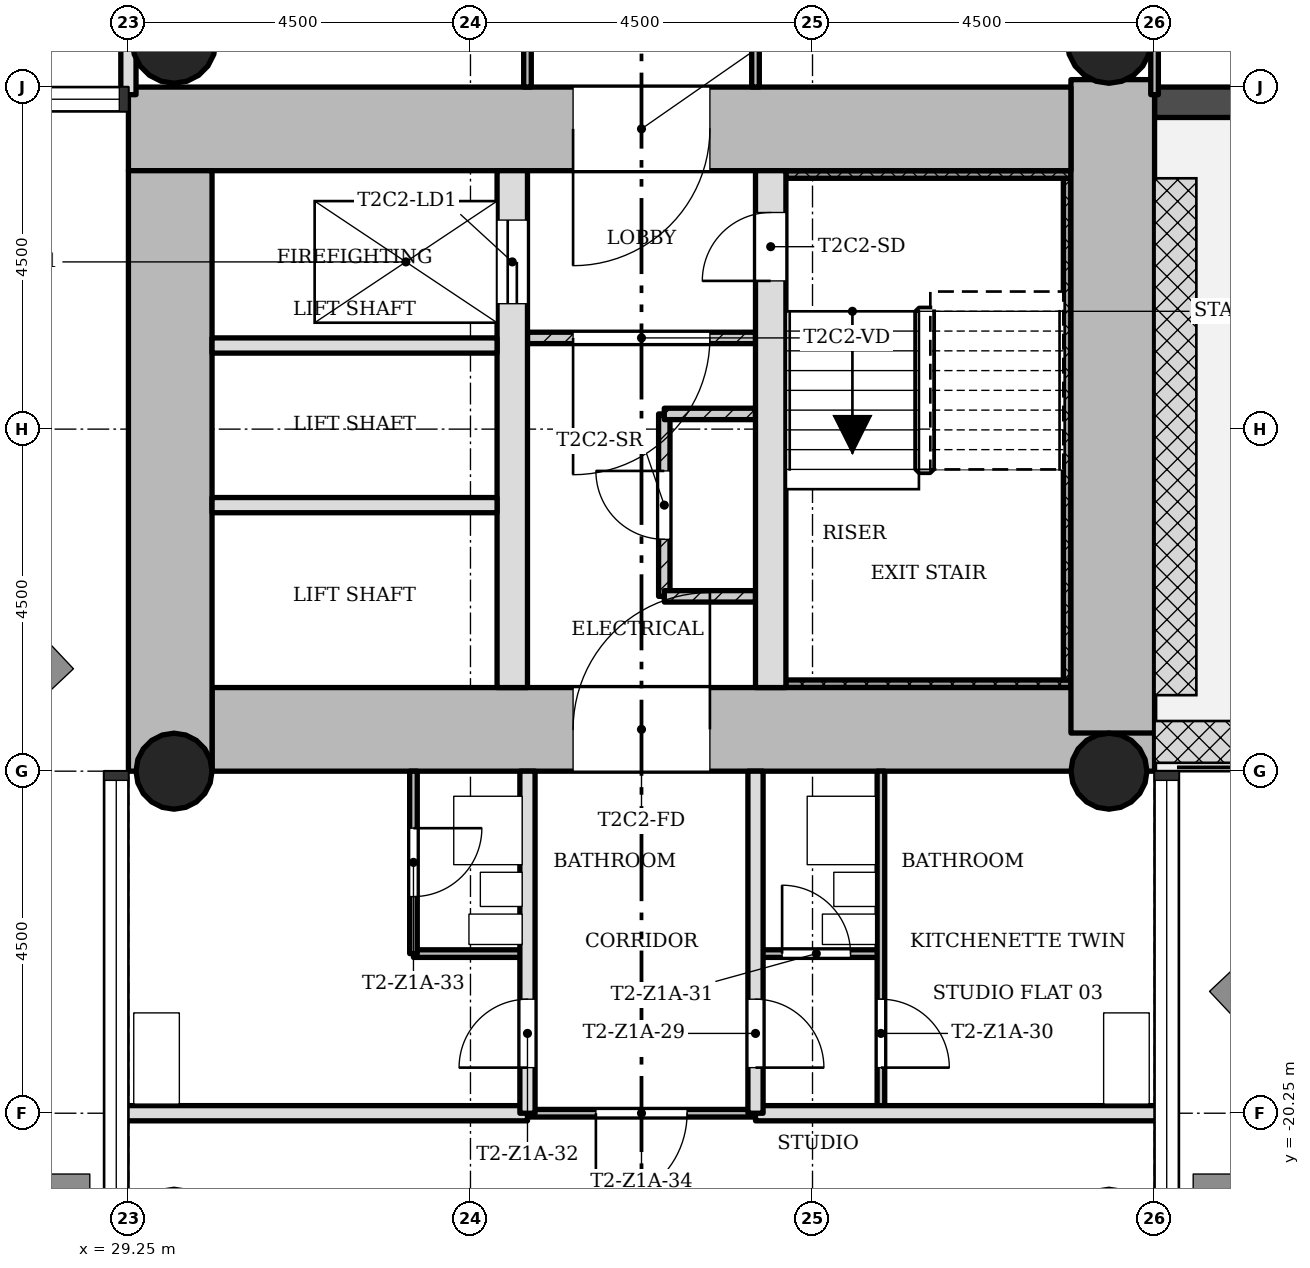
"""IFC4 building model, lengths in metres.
Left out: names, types, materials, properties, quantities, classifications, styles, units other than length and angle.
Written with IfcOpenShell. Run it as: python <this file> out.ifc"""

import sys

from ifc_helpers import new_model, si_unit, direction, frame, frame_2d, origin, origin_2d, place, context, subcontext, project, spatial, rectangle, hollow_circle, extrude, element, fill, save


model = new_model("IFC4")
c1 = context("Model", 3, precision=1e-05, world=origin(), true_north=direction((0.0, 1.0)))
c2 = subcontext(c1, "Body", "Model", "MODEL_VIEW")
j1 = project(units=[si_unit("LENGTHUNIT", "METRE"), si_unit("PLANEANGLEUNIT", "RADIAN")], contexts=[c1])
p1 = place(None, origin())
s1 = spatial("IfcSite", under=j1, at=p1, CompositionType="ELEMENT")
p2 = place(p1, origin())
s2 = spatial("IfcBuilding", under=s1, at=p2, CompositionType="ELEMENT")
p3 = place(p2, frame((0.0, 0.0, 31.3)))
s3 = spatial("IfcBuildingStorey", under=s2, at=p3, CompositionType="ELEMENT", Elevation=31.3)
p4 = place(p3, frame((30.35, -15.2, 0.0), z_axis=(0.0, 0.0, 1.0), x_axis=(1.0, 0.0, 0.0)))
e1 = element("IfcWall", 1, at=p4, inside=s3, PredefinedType="SHEAR", context=c2, shape_type="SweptSolid", body=[
    extrude(rectangle(XDim=12.4, YDim=1.1, at=frame_2d((6.2, 0.0))), origin(), (0.0, 0.0, 1.0), 3.4),
])
p5 = place(p4, frame((4.75, 0.0, 0.0)))
e2 = element("IfcOpeningElement", 2, at=p5, cuts=e1, PredefinedType="OPENING", context=c2, shape_type="SweptSolid", body=[
    extrude(rectangle(XDim=1.8, YDim=2.1, at=frame_2d((0.9, 1.05))), frame((0.0, 0.56, 0.0), z_axis=(0.0, -1.0, 0.0), x_axis=(1.0, 0.0, 0.0)), (0.0, 0.0, 1.0), 1.12),
])
p6 = place(p3, frame((42.2, -15.248, 0.0), z_axis=(0.0, 0.0, 1.0), x_axis=(0.0, 1.0, 0.0)))
e3 = element("IfcWall", 3, at=p6, inside=s3, PredefinedType="SHEAR", context=c2, shape_type="SweptSolid", body=[
    extrude(rectangle(XDim=8.596, YDim=1.1, at=frame_2d((4.298, 0.0))), origin(), (0.0, 0.0, 1.0), 3.4),
])
p7 = place(p3, frame((41.65, -7.3, 0.0), z_axis=(0.0, 0.0, 1.0), x_axis=(-1.0, 0.0, 0.0)))
e4 = element("IfcWall", 4, at=p7, inside=s3, PredefinedType="SHEAR", context=c2, shape_type="SweptSolid", body=[
    extrude(rectangle(XDim=12.4, YDim=1.1, at=frame_2d((6.2, 0.0))), origin(), (0.0, 0.0, 1.0), 3.4),
])
p8 = place(p7, frame((4.75, 0.0, 0.0)))
e5 = element("IfcOpeningElement", 5, at=p8, cuts=e4, PredefinedType="OPENING", context=c2, shape_type="SweptSolid", body=[
    extrude(rectangle(XDim=1.8, YDim=2.1, at=frame_2d((0.9, 1.05))), frame((0.0, 0.56, 0.0), z_axis=(0.0, -1.0, 0.0), x_axis=(1.0, 0.0, 0.0)), (0.0, 0.0, 1.0), 1.12),
])
p9 = place(p3, frame((29.8, -7.85, 0.0), z_axis=(0.0, 0.0, 1.0), x_axis=(0.0, -1.0, 0.0)))
e6 = element("IfcWall", 6, at=p9, inside=s3, PredefinedType="SHEAR", context=c2, shape_type="SweptSolid", body=[
    extrude(rectangle(XDim=7.9, YDim=1.1, at=frame_2d((3.95, 0.0))), origin(), (0.0, 0.0, 1.0), 3.4),
])
p10 = place(p3, frame((34.3, -14.65, 0.0), z_axis=(0.0, 0.0, 1.0), x_axis=(0.0, 1.0, 0.0)))
e7 = element("IfcWall", 7, at=p10, inside=s3, PredefinedType="SHEAR", context=c2, shape_type="SweptSolid", body=[
    extrude(rectangle(XDim=6.8, YDim=0.4, at=frame_2d((3.4, 0.0))), origin(), (0.0, 0.0, 1.0), 3.4),
])
p11 = place(p10, frame((5.05, 0.0, 0.0)))
e8 = element("IfcOpeningElement", 8, at=p11, cuts=e7, PredefinedType="OPENING", context=c2, shape_type="SweptSolid", body=[
    extrude(rectangle(XDim=1.1, YDim=2.1, at=frame_2d((0.55, 1.05))), frame((0.0, 0.21, 0.0), z_axis=(0.0, -1.0, 0.0), x_axis=(1.0, 0.0, 0.0)), (0.0, 0.0, 1.0), 0.42),
])
p12 = place(p3, frame((37.7, -14.65, 0.0), z_axis=(0.0, 0.0, 1.0), x_axis=(0.0, 1.0, 0.0)))
e9 = element("IfcWall", 9, at=p12, inside=s3, PredefinedType="SHEAR", context=c2, shape_type="SweptSolid", body=[
    extrude(rectangle(XDim=6.8, YDim=0.4, at=frame_2d((3.4, 0.0))), origin(), (0.0, 0.0, 1.0), 3.4),
])
p13 = place(p12, frame((5.35, 0.0, 0.0)))
e10 = element("IfcOpeningElement", 10, at=p13, cuts=e9, PredefinedType="OPENING", context=c2, shape_type="SweptSolid", body=[
    extrude(rectangle(XDim=0.9, YDim=2.1, at=frame_2d((0.45, 1.05))), frame((0.0, 0.21, 0.0), z_axis=(0.0, -1.0, 0.0), x_axis=(1.0, 0.0, 0.0)), (0.0, 0.0, 1.0), 0.42),
])
for number, where, z_axis, x_axis in (
    (11, (42.15, -15.75, 0.0), (0.0, 0.0, 1.0), (1.0, 0.0, 0.0)),
    (12, (29.85, -15.75, 0.0), (0.0, 0.0, 1.0), (1.0, 0.0, 0.0)),
):
    element("IfcColumn", number, at=place(p3, frame(where, z_axis=z_axis, x_axis=x_axis)), inside=s3, PredefinedType="COLUMN", context=c2, shape_type="SweptSolid", body=[
        extrude(hollow_circle(Radius=0.5, WallThickness=0.036, at=origin_2d()), origin(), (0.0, 0.0, 1.0), 3.4),
    ])
for number, where, z_axis, x_axis in (
    (13, (42.15, -6.15, 0.0), (0.0, 0.0, 1.0), (1.0, 0.0, 0.0)),
    (14, (29.85, -6.15, 0.0), (0.0, 0.0, 1.0), (1.0, 0.0, 0.0)),
):
    element("IfcColumn", number, at=place(p3, frame(where, z_axis=z_axis, x_axis=x_axis)), inside=s3, PredefinedType="COLUMN", context=c2, shape_type="SweptSolid", body=[
        extrude(hollow_circle(Radius=0.55, WallThickness=0.04, at=origin_2d()), origin(), (0.0, 0.0, 1.0), 3.4),
    ])
p14 = place(p3, frame((42.75, -6.95, -0.02), z_axis=(0.0, 0.0, 1.0), x_axis=(1.0, 0.0, 0.0)))
e15 = element("IfcWall", 15, at=p14, inside=s3, PredefinedType="STANDARD", context=c2, shape_type="SweptSolid", body=[
    extrude(rectangle(XDim=4.5, YDim=0.4, at=frame_2d((2.25, 0.0))), origin(), (0.0, 0.0, 1.0), 3.12),
])
p15 = place(p14, frame((1.35, 0.0, 0.02)))
e16 = element("IfcOpeningElement", 16, at=p15, cuts=e15, PredefinedType="OPENING", context=c2, shape_type="SweptSolid", body=[
    extrude(rectangle(XDim=1.8, YDim=2.1, at=frame_2d((0.9, 1.05))), frame((0.0, 0.21, 0.0), z_axis=(0.0, -1.0, 0.0), x_axis=(1.0, 0.0, 0.0)), (0.0, 0.0, 1.0), 0.42),
])
p16 = place(p3, frame((34.5, -10.05, 0.0), z_axis=(0.0, 0.0, 1.0), x_axis=(1.0, 0.0, 0.0)))
e17 = element("IfcWall", 17, at=p16, inside=s3, PredefinedType="PARTITIONING", context=c2, shape_type="SweptSolid", body=[
    extrude(rectangle(XDim=3.0, YDim=0.15, at=frame_2d((1.5, 0.0))), origin(), (0.0, 0.0, 1.0), 3.0),
])
p17 = place(p16, frame((0.6, 0.0, 0.0)))
e18 = element("IfcOpeningElement", 18, at=p17, cuts=e17, PredefinedType="OPENING", context=c2, shape_type="SweptSolid", body=[
    extrude(rectangle(XDim=1.8, YDim=2.1, at=frame_2d((0.9, 1.05))), frame((0.0, 0.085, 0.0), z_axis=(0.0, -1.0, 0.0), x_axis=(1.0, 0.0, 0.0)), (0.0, 0.0, 1.0), 0.17),
])
for number, where, z_axis, x_axis in (
    (19, (30.35, -10.15, 0.0), (0.0, 0.0, 1.0), (1.0, 0.0, 0.0)),
    (20, (30.35, -12.25, 0.0), (0.0, 0.0, 1.0), (1.0, 0.0, 0.0)),
):
    element("IfcWall", number, at=place(p3, frame(where, z_axis=z_axis, x_axis=x_axis)), inside=s3, PredefinedType="SOLIDWALL", context=c2, shape_type="SweptSolid", body=[
        extrude(rectangle(XDim=3.75, YDim=0.2, at=frame_2d((1.875, 0.0))), origin(), (0.0, 0.0, 1.0), 3.0),
    ])
p18 = place(p3, frame((36.3, -11.05, 0.0), z_axis=(0.0, 0.0, 1.0), x_axis=(0.0, -1.0, 0.0)))
e21 = element("IfcWall", 21, at=p18, inside=s3, PredefinedType="PARTITIONING", context=c2, shape_type="SweptSolid", body=[
    extrude(rectangle(XDim=2.4, YDim=0.15, at=frame_2d((1.2, 0.0))), origin(), (0.0, 0.0, 1.0), 3.0),
])
p19 = place(p18, frame((0.75, 0.0, 0.0)))
e22 = element("IfcOpeningElement", 22, at=p19, cuts=e21, PredefinedType="OPENING", context=c2, shape_type="SweptSolid", body=[
    extrude(rectangle(XDim=0.9, YDim=2.1, at=frame_2d((0.45, 1.05))), frame((0.0, 0.085, 0.0), z_axis=(0.0, -1.0, 0.0), x_axis=(1.0, 0.0, 0.0)), (0.0, 0.0, 1.0), 0.17),
])
for number, where, z_axis, x_axis in (
    (23, (36.3, -11.05, 0.0), (0.0, 0.0, 1.0), (1.0, 0.0, 0.0)),
    (24, (36.3, -13.45, 0.0), (0.0, 0.0, 1.0), (1.0, 0.0, 0.0)),
):
    element("IfcWall", number, at=place(p3, frame(where, z_axis=z_axis, x_axis=x_axis)), inside=s3, PredefinedType="PARTITIONING", context=c2, shape_type="SweptSolid", body=[
        extrude(rectangle(XDim=1.2, YDim=0.15, at=frame_2d((0.6, 0.0))), origin(), (0.0, 0.0, 1.0), 3.0),
    ])
p20 = place(p3, frame((37.5, -20.25, 0.0), z_axis=(0.0, 0.0, 1.0), x_axis=(-1.0, 0.0, 0.0)))
e25 = element("IfcWall", 25, at=p20, inside=s3, PredefinedType="PARTITIONING", context=c2, shape_type="SweptSolid", body=[
    extrude(rectangle(XDim=3.0, YDim=0.1, at=frame_2d((1.5, 0.0))), origin(), (0.0, 0.0, 1.0), 3.0),
])
p21 = place(p20, frame((0.9, 0.0, 0.0)))
e26 = element("IfcOpeningElement", 26, at=p21, cuts=e25, PredefinedType="OPENING", context=c2, shape_type="SweptSolid", body=[
    extrude(rectangle(XDim=1.2, YDim=2.1, at=frame_2d((0.6, 1.05))), frame((0.0, 0.06, 0.0), z_axis=(0.0, -1.0, 0.0), x_axis=(1.0, 0.0, 0.0)), (0.0, 0.0, 1.0), 0.12),
])
for number, where, z_axis, x_axis in (
    (27, (42.85, -20.25, 0.0), (0.0, 0.0, 1.0), (-1.0, 0.0, 0.0)),
    (28, (34.5, -20.25, 0.0), (0.0, 0.0, 1.0), (-1.0, 0.0, 0.0)),
):
    element("IfcWall", number, at=place(p3, frame(where, z_axis=z_axis, x_axis=x_axis)), inside=s3, PredefinedType="SOLIDWALL", context=c2, shape_type="SweptSolid", body=[
        extrude(rectangle(XDim=5.35, YDim=0.2, at=frame_2d((2.675, 0.0))), origin(), (0.0, 0.0, 1.0), 3.0),
    ])
p22 = place(p3, frame((39.15, -18.15, 0.0), z_axis=(0.0, 0.0, 1.0), x_axis=(-1.0, 0.0, 0.0)))
e29 = element("IfcWall", 29, at=p22, inside=s3, PredefinedType="PARTITIONING", context=c2, shape_type="SweptSolid", body=[
    extrude(rectangle(XDim=1.65, YDim=0.1, at=frame_2d((0.825, 0.0))), origin(), (0.0, 0.0, 1.0), 3.0),
])
p23 = place(p22, frame((0.4, 0.0, 0.0)))
e30 = element("IfcOpeningElement", 30, at=p23, cuts=e29, PredefinedType="OPENING", context=c2, shape_type="SweptSolid", body=[
    extrude(rectangle(XDim=0.9, YDim=2.1, at=frame_2d((0.45, 1.05))), frame((0.0, 0.06, 0.0), z_axis=(0.0, -1.0, 0.0), x_axis=(1.0, 0.0, 0.0)), (0.0, 0.0, 1.0), 0.12),
])
p24 = place(p3, frame((34.5, -18.15, 0.0), z_axis=(0.0, 0.0, 1.0), x_axis=(-1.0, 0.0, 0.0)))
e31 = element("IfcWall", 31, at=p24, inside=s3, PredefinedType="PARTITIONING", context=c2, shape_type="SweptSolid", body=[
    extrude(rectangle(XDim=1.5, YDim=0.1, at=frame_2d((0.75, 0.0))), origin(), (0.0, 0.0, 1.0), 3.0),
])
p25 = place(p3, frame((42.75, -6.85, 0.0), z_axis=(0.0, 0.0, 1.0), x_axis=(0.0, 1.0, 0.0)))
e32 = element("IfcWall", 32, at=p25, inside=s3, PredefinedType="PARTITIONING", context=c2, shape_type="SweptSolid", body=[
    extrude(rectangle(XDim=5.95, YDim=0.1, at=frame_2d((2.975, 0.0))), origin(), (0.0, 0.0, 1.0), 3.0),
])
p26 = place(p3, frame((39.15, -20.25, 0.0), z_axis=(0.0, 0.0, 1.0), x_axis=(0.0, 1.0, 0.0)))
e33 = element("IfcWall", 33, at=p26, inside=s3, PredefinedType="PARTITIONING", context=c2, shape_type="SweptSolid", body=[
    extrude(rectangle(XDim=4.5, YDim=0.1, at=frame_2d((2.25, 0.0))), origin(), (0.0, 0.0, 1.0), 3.0),
])
p27 = place(p26, frame((0.6, 0.0, 0.0)))
e34 = element("IfcOpeningElement", 34, at=p27, cuts=e33, PredefinedType="OPENING", context=c2, shape_type="SweptSolid", body=[
    extrude(rectangle(XDim=0.9, YDim=2.1, at=frame_2d((0.45, 1.05))), frame((0.0, 0.06, 0.0), z_axis=(0.0, -1.0, 0.0), x_axis=(1.0, 0.0, 0.0)), (0.0, 0.0, 1.0), 0.12),
])
p28 = place(p3, frame((37.5, -6.75, 0.0), z_axis=(0.0, 0.0, 1.0), x_axis=(0.0, 1.0, 0.0)))
e35 = element("IfcWall", 35, at=p28, inside=s3, PredefinedType="PARTITIONING", context=c2, shape_type="SweptSolid", body=[
    extrude(rectangle(XDim=5.85, YDim=0.1, at=frame_2d((2.925, 0.0))), origin(), (0.0, 0.0, 1.0), 3.0),
])
p29 = place(p28, frame((1.575, 0.0, 0.0)))
e36 = element("IfcOpeningElement", 36, at=p29, cuts=e35, PredefinedType="OPENING", context=c2, shape_type="SweptSolid", body=[
    extrude(rectangle(XDim=0.9, YDim=2.1, at=frame_2d((0.45, 1.05))), frame((0.0, 0.06, 0.0), z_axis=(0.0, -1.0, 0.0), x_axis=(1.0, 0.0, 0.0)), (0.0, 0.0, 1.0), 0.12),
])
p30 = place(p3, frame((37.5, -20.25, 0.0), z_axis=(0.0, 0.0, 1.0), x_axis=(0.0, 1.0, 0.0)))
e37 = element("IfcWall", 37, at=p30, inside=s3, PredefinedType="SOLIDWALL", context=c2, shape_type="SweptSolid", body=[
    extrude(rectangle(XDim=4.5, YDim=0.2, at=frame_2d((2.25, 0.0))), origin(), (0.0, 0.0, 1.0), 3.0),
])
p31 = place(p30, frame((0.6, 0.0, 0.0)))
e38 = element("IfcOpeningElement", 38, at=p31, cuts=e37, PredefinedType="OPENING", context=c2, shape_type="SweptSolid", body=[
    extrude(rectangle(XDim=0.9, YDim=2.1, at=frame_2d((0.45, 1.05))), frame((0.0, 0.11, 0.0), z_axis=(0.0, -1.0, 0.0), x_axis=(1.0, 0.0, 0.0)), (0.0, 0.0, 1.0), 0.22),
])
p32 = place(p3, frame((34.5, -6.75, 0.0), z_axis=(0.0, 0.0, 1.0), x_axis=(0.0, 1.0, 0.0)))
e39 = element("IfcWall", 39, at=p32, inside=s3, PredefinedType="PARTITIONING", context=c2, shape_type="SweptSolid", body=[
    extrude(rectangle(XDim=5.85, YDim=0.1, at=frame_2d((2.925, 0.0))), origin(), (0.0, 0.0, 1.0), 3.0),
])
p33 = place(p32, frame((2.475, 0.0, 0.0)))
e40 = element("IfcOpeningElement", 40, at=p33, cuts=e39, PredefinedType="OPENING", context=c2, shape_type="SweptSolid", body=[
    extrude(rectangle(XDim=0.9, YDim=2.1, at=frame_2d((0.45, 1.05))), frame((0.0, 0.06, 0.0), z_axis=(0.0, -1.0, 0.0), x_axis=(1.0, 0.0, 0.0)), (0.0, 0.0, 1.0), 0.12),
])
p34 = place(p3, frame((34.5, -20.25, 0.0), z_axis=(0.0, 0.0, 1.0), x_axis=(0.0, 1.0, 0.0)))
e41 = element("IfcWall", 41, at=p34, inside=s3, PredefinedType="SOLIDWALL", context=c2, shape_type="SweptSolid", body=[
    extrude(rectangle(XDim=4.5, YDim=0.2, at=frame_2d((2.25, 0.0))), origin(), (0.0, 0.0, 1.0), 3.0),
])
p35 = place(p34, frame((0.6, 0.0, 0.0)))
e42 = element("IfcOpeningElement", 42, at=p35, cuts=e41, PredefinedType="OPENING", context=c2, shape_type="SweptSolid", body=[
    extrude(rectangle(XDim=0.9, YDim=2.1, at=frame_2d((0.45, 1.05))), frame((0.0, 0.11, 0.0), z_axis=(0.0, -1.0, 0.0), x_axis=(1.0, 0.0, 0.0)), (0.0, 0.0, 1.0), 0.22),
])
p36 = place(p3, frame((33.0, -18.15, 0.0), z_axis=(0.0, 0.0, 1.0), x_axis=(0.0, 1.0, 0.0)))
e43 = element("IfcWall", 43, at=p36, inside=s3, PredefinedType="PARTITIONING", context=c2, shape_type="SweptSolid", body=[
    extrude(rectangle(XDim=2.4, YDim=0.1, at=frame_2d((1.2, 0.0))), origin(), (0.0, 0.0, 1.0), 3.0),
])
p37 = place(p36, frame((0.75, 0.0, 0.0)))
e44 = element("IfcOpeningElement", 44, at=p37, cuts=e43, PredefinedType="OPENING", context=c2, shape_type="SweptSolid", body=[
    extrude(rectangle(XDim=0.9, YDim=2.1, at=frame_2d((0.45, 1.05))), frame((0.0, 0.06, 0.0), z_axis=(0.0, -1.0, 0.0), x_axis=(1.0, 0.0, 0.0)), (0.0, 0.0, 1.0), 0.12),
])
p38 = place(p3, frame((29.25, -6.85, 0.0), z_axis=(0.0, 0.0, 1.0), x_axis=(0.0, 1.0, 0.0)))
e45 = element("IfcWall", 45, at=p38, inside=s3, PredefinedType="SOLIDWALL", context=c2, shape_type="SweptSolid", body=[
    extrude(rectangle(XDim=13.7, YDim=0.2, at=frame_2d((6.85, 0.0))), origin(), (0.0, 0.0, 1.0), 3.0),
])
p39 = place(p38, frame((6.4, 0.0, 0.0)))
e46 = element("IfcOpeningElement", 46, at=p39, cuts=e45, PredefinedType="OPENING", context=c2, shape_type="SweptSolid", body=[
    extrude(rectangle(XDim=0.9, YDim=2.1, at=frame_2d((0.45, 1.05))), frame((0.0, 0.11, 0.0), z_axis=(0.0, -1.0, 0.0), x_axis=(1.0, 0.0, 0.0)), (0.0, 0.0, 1.0), 0.22),
])
p40 = place(p3, frame((37.9, -14.6, 0.0), z_axis=(0.0, 0.0, 1.0), x_axis=(1.0, 0.0, 0.0)))
e47 = element("IfcWall", 47, at=p40, inside=s3, PredefinedType="SHEAR", context=c2, shape_type="SweptSolid", body=[
    extrude(rectangle(XDim=3.75, YDim=0.1, at=frame_2d((1.875, 0.0))), origin(), (0.0, 0.0, 1.0), 3.4),
])
p41 = place(p3, frame((41.6, -7.95, 0.0), z_axis=(0.0, 0.0, 1.0), x_axis=(0.0, -1.0, 0.0)))
e48 = element("IfcWall", 48, at=p41, inside=s3, PredefinedType="SHEAR", context=c2, shape_type="SweptSolid", body=[
    extrude(rectangle(XDim=6.6, YDim=0.1, at=frame_2d((3.3, 0.0))), origin(), (0.0, 0.0, 1.0), 3.4),
])
p42 = place(p3, frame((37.9, -7.9, 0.0), z_axis=(0.0, 0.0, 1.0), x_axis=(1.0, 0.0, 0.0)))
e49 = element("IfcWall", 49, at=p42, inside=s3, PredefinedType="SHEAR", context=c2, shape_type="SweptSolid", body=[
    extrude(rectangle(XDim=3.75, YDim=0.1, at=frame_2d((1.875, 0.0))), origin(), (0.0, 0.0, 1.0), 3.4),
])
p43 = place(p17, origin())
e50 = element("IfcDoor", 50, at=p43, inside=s3, OperationType="SINGLE_SWING_LEFT", PredefinedType="DOOR", context=c2, shape_type="SweptSolid", body=[
    extrude(rectangle(XDim=1.8, YDim=2.1, at=frame_2d((0.9, 1.05))), frame((0.0, 0.025, 0.0), z_axis=(0.0, -1.0, 0.0), x_axis=(1.0, 0.0, 0.0)), (0.0, 0.0, 1.0), 0.05),
])
fill(e18, e50)
p44 = place(p19, origin())
e51 = element("IfcDoor", 51, at=p44, inside=s3, OperationType="SINGLE_SWING_LEFT", PredefinedType="DOOR", context=c2, shape_type="SweptSolid", body=[
    extrude(rectangle(XDim=0.9, YDim=2.1, at=frame_2d((0.45, 1.05))), frame((0.0, 0.025, 0.0), z_axis=(0.0, -1.0, 0.0), x_axis=(1.0, 0.0, 0.0)), (0.0, 0.0, 1.0), 0.05),
])
fill(e22, e51)
p45 = place(p31, origin())
e52 = element("IfcDoor", 52, at=p45, inside=s3, OperationType="SINGLE_SWING_LEFT", PredefinedType="DOOR", context=c2, shape_type="SweptSolid", body=[
    extrude(rectangle(XDim=0.9, YDim=2.1, at=frame_2d((0.45, 1.05))), frame((0.0, 0.025, 0.0), z_axis=(0.0, -1.0, 0.0), x_axis=(1.0, 0.0, 0.0)), (0.0, 0.0, 1.0), 0.05),
])
fill(e38, e52)
p46 = place(p27, origin())
e53 = element("IfcDoor", 53, at=p46, inside=s3, OperationType="SINGLE_SWING_LEFT", PredefinedType="DOOR", context=c2, shape_type="SweptSolid", body=[
    extrude(rectangle(XDim=0.9, YDim=2.1, at=frame_2d((0.45, 1.05))), frame((0.0, 0.025, 0.0), z_axis=(0.0, -1.0, 0.0), x_axis=(1.0, 0.0, 0.0)), (0.0, 0.0, 1.0), 0.05),
])
fill(e34, e53)
p47 = place(p23, origin())
e54 = element("IfcDoor", 54, at=p47, inside=s3, OperationType="SINGLE_SWING_RIGHT", PredefinedType="DOOR", context=c2, shape_type="SweptSolid", body=[
    extrude(rectangle(XDim=0.9, YDim=2.1, at=frame_2d((0.45, 1.05))), frame((0.0, 0.025, 0.0), z_axis=(0.0, -1.0, 0.0), x_axis=(1.0, 0.0, 0.0)), (0.0, 0.0, 1.0), 0.05),
])
fill(e30, e54)
p48 = place(p35, origin())
e55 = element("IfcDoor", 55, at=p48, inside=s3, OperationType="SINGLE_SWING_RIGHT", PredefinedType="DOOR", context=c2, shape_type="SweptSolid", body=[
    extrude(rectangle(XDim=0.9, YDim=2.1, at=frame_2d((0.45, 1.05))), frame((0.0, 0.025, 0.0), z_axis=(0.0, -1.0, 0.0), x_axis=(1.0, 0.0, 0.0)), (0.0, 0.0, 1.0), 0.05),
])
fill(e42, e55)
p49 = place(p37, origin())
e56 = element("IfcDoor", 56, at=p49, inside=s3, OperationType="SINGLE_SWING_RIGHT", PredefinedType="DOOR", context=c2, shape_type="SweptSolid", body=[
    extrude(rectangle(XDim=0.9, YDim=2.1, at=frame_2d((0.45, 1.05))), frame((0.0, 0.025, 0.0), z_axis=(0.0, -1.0, 0.0), x_axis=(1.0, 0.0, 0.0)), (0.0, 0.0, 1.0), 0.05),
])
fill(e44, e56)
p50 = place(p21, origin())
e57 = element("IfcDoor", 57, at=p50, inside=s3, OperationType="SINGLE_SWING_LEFT", PredefinedType="DOOR", context=c2, shape_type="SweptSolid", body=[
    extrude(rectangle(XDim=1.2, YDim=2.1, at=frame_2d((0.6, 1.05))), frame((0.0, 0.025, 0.0), z_axis=(0.0, -1.0, 0.0), x_axis=(1.0, 0.0, 0.0)), (0.0, 0.0, 1.0), 0.05),
])
fill(e26, e57)
p51 = place(p13, origin())
e58 = element("IfcDoor", 58, at=p51, inside=s3, OperationType="SINGLE_SWING_RIGHT", PredefinedType="DOOR", context=c2, shape_type="SweptSolid", body=[
    extrude(rectangle(XDim=0.9, YDim=2.1, at=frame_2d((0.45, 1.05))), frame((0.0, 0.025, 0.0), z_axis=(0.0, -1.0, 0.0), x_axis=(1.0, 0.0, 0.0)), (0.0, 0.0, 1.0), 0.05),
])
fill(e10, e58)
p52 = place(p11, origin())
e59 = element("IfcDoor", 59, at=p52, inside=s3, OperationType="SLIDING_TO_LEFT", PredefinedType="DOOR", context=c2, shape_type="SweptSolid", body=[
    extrude(rectangle(XDim=1.1, YDim=2.1, at=frame_2d((0.55, 1.05))), frame((0.0, 0.025, 0.0), z_axis=(0.0, -1.0, 0.0), x_axis=(1.0, 0.0, 0.0)), (0.0, 0.0, 1.0), 0.05),
])
fill(e8, e59)
p53 = place(p8, origin())
e60 = element("IfcDoor", 60, at=p53, inside=s3, OperationType="SINGLE_SWING_LEFT", PredefinedType="DOOR", context=c2, shape_type="SweptSolid", body=[
    extrude(rectangle(XDim=1.8, YDim=2.1, at=frame_2d((0.9, 1.05))), frame((0.0, 0.025, 0.0), z_axis=(0.0, -1.0, 0.0), x_axis=(1.0, 0.0, 0.0)), (0.0, 0.0, 1.0), 0.05),
])
fill(e5, e60)
p54 = place(p5, origin())
e61 = element("IfcDoor", 61, at=p54, inside=s3, OperationType="SINGLE_SWING_LEFT", PredefinedType="DOOR", context=c2, shape_type="SweptSolid", body=[
    extrude(rectangle(XDim=1.8, YDim=2.1, at=frame_2d((0.9, 1.05))), frame((0.0, 0.025, 0.0), z_axis=(0.0, -1.0, 0.0), x_axis=(1.0, 0.0, 0.0)), (0.0, 0.0, 1.0), 0.05),
])
fill(e2, e61)
save(model, sys.argv[1])
